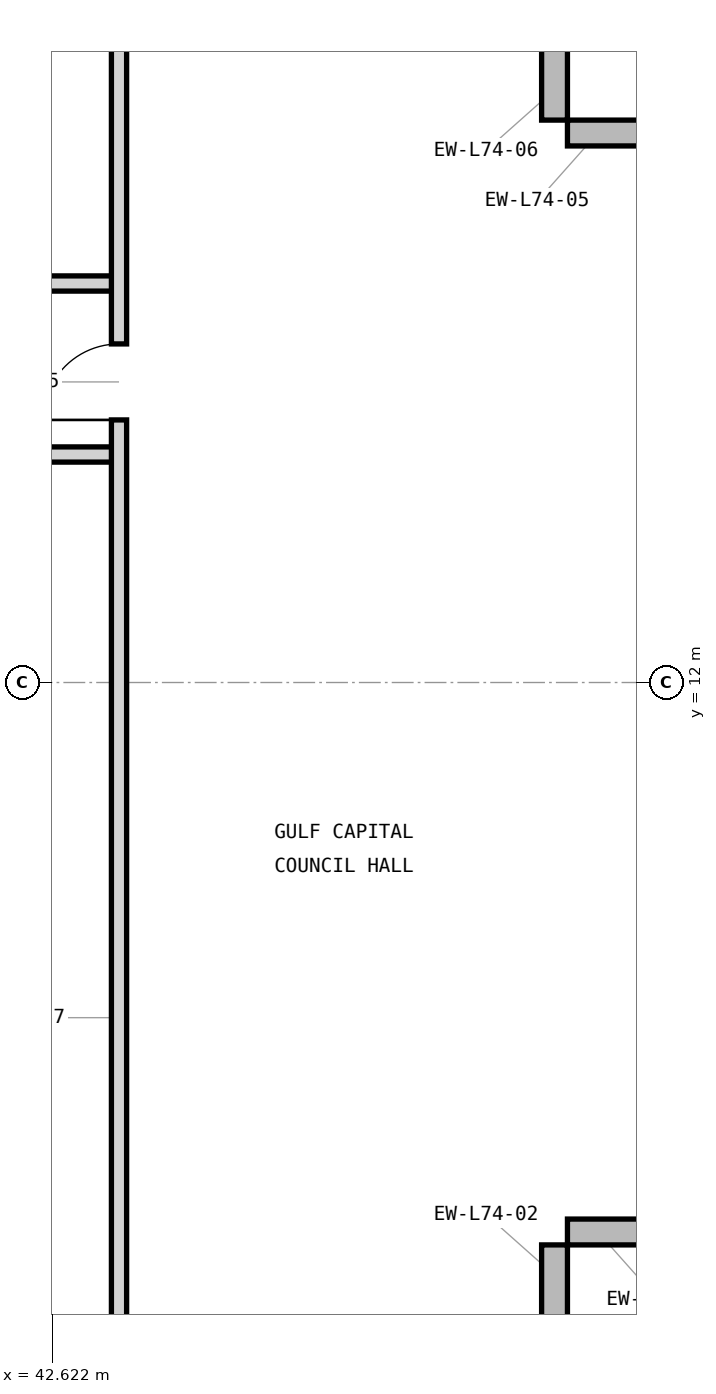
"""IFC4 building model, lengths in metres.
Left out: names, types, materials, properties, quantities, classifications, styles, units other than length and angle.
Written with IfcOpenShell. Run it as: python <this file> out.ifc"""

import sys

from ifc_helpers import new_model, si_unit, direction, frame, frame_2d, origin, place, context, subcontext, project, spatial, rectangle, extrude, element, fill, save


model = new_model("IFC4")
c1 = context("Model", 3, precision=1e-05, world=origin(), true_north=direction((0.0, 1.0)))
c2 = subcontext(c1, "Body", "Model", "MODEL_VIEW")
j1 = project(units=[si_unit("LENGTHUNIT", "METRE"), si_unit("PLANEANGLEUNIT", "RADIAN")], contexts=[c1])
p1 = place(None, origin())
s1 = spatial("IfcSite", under=j1, at=p1, CompositionType="ELEMENT")
p2 = place(p1, origin())
s2 = spatial("IfcBuilding", under=s1, at=p2, CompositionType="ELEMENT")
p3 = place(p2, frame((0.0, 0.0, 301.5)))
s3 = spatial("IfcBuildingStorey", under=s2, at=p3, CompositionType="ELEMENT", Elevation=301.5)
for number, where, z_axis, x_axis in (
    (1, (49.23, 3.0, 0.0), (0.0, 0.0, 1.0), (0.0, 1.0, 0.0)),
    (2, (49.4, 4.77, 0.0), (0.0, 0.0, 1.0), (1.0, 0.0, 0.0)),
    (3, (51.0, 19.23, 0.0), (0.0, 0.0, 1.0), (-1.0, 0.0, 0.0)),
    (4, (49.23, 19.4, 0.0), (0.0, 0.0, 1.0), (0.0, 1.0, 0.0)),
):
    element("IfcWall", number, at=place(p3, frame(where, z_axis=z_axis, x_axis=x_axis)), inside=s3, PredefinedType="STANDARD", context=c2, shape_type="SweptSolid", body=[
        extrude(rectangle(XDim=1.6, YDim=0.34, at=frame_2d((0.8, 0.0))), origin(), (0.0, 0.0, 1.0), 3.715),
    ])
p4 = place(p3, frame((37.2, 15.0, 0.0), z_axis=(0.0, 0.0, 1.0), x_axis=(1.0, 0.0, 0.0)))
e5 = element("IfcWall", 5, at=p4, inside=s3, PredefinedType="PARTITIONING", context=c2, shape_type="SweptSolid", body=[
    extrude(rectangle(XDim=6.3, YDim=0.2, at=frame_2d((3.15, 0.0))), origin(), (0.0, 0.0, 1.0), 3.354),
])
p5 = place(p4, frame((2.4, 0.0, 0.0)))
e6 = element("IfcOpeningElement", 6, at=p5, cuts=e5, PredefinedType="OPENING", context=c2, shape_type="SweptSolid", body=[
    extrude(rectangle(XDim=1.5, YDim=2.3, at=frame_2d((0.75, 1.15))), frame((0.0, 0.11, 0.0), z_axis=(0.0, -1.0, 0.0), x_axis=(1.0, 0.0, 0.0)), (0.0, 0.0, 1.0), 0.22),
])
p6 = place(p3, frame((39.2, 17.25, 0.0), z_axis=(0.0, 0.0, 1.0), x_axis=(1.0, 0.0, 0.0)))
e7 = element("IfcWall", 7, at=p6, inside=s3, PredefinedType="PARTITIONING", context=c2, shape_type="SweptSolid", body=[
    extrude(rectangle(XDim=4.3, YDim=0.2, at=frame_2d((2.15, 0.0))), origin(), (0.0, 0.0, 1.0), 3.705),
])
p7 = place(p6, frame((1.65, 0.0, 0.0)))
e8 = element("IfcOpeningElement", 8, at=p7, cuts=e7, PredefinedType="OPENING", context=c2, shape_type="SweptSolid", body=[
    extrude(rectangle(XDim=1.0, YDim=2.15, at=frame_2d((0.5, 1.075))), frame((0.0, 0.11, 0.0), z_axis=(0.0, -1.0, 0.0), x_axis=(1.0, 0.0, 0.0)), (0.0, 0.0, 1.0), 0.22),
])
p8 = place(p3, frame((43.5, 3.18, 0.0), z_axis=(0.0, 0.0, 1.0), x_axis=(0.0, 1.0, 0.0)))
e9 = element("IfcWall", 9, at=p8, inside=s3, PredefinedType="PARTITIONING", context=c2, shape_type="SweptSolid", body=[
    extrude(rectangle(XDim=17.64, YDim=0.2, at=frame_2d((8.82, 0.0))), origin(), (0.0, 0.0, 1.0), 3.705),
])
p9 = place(p8, frame((12.275, 0.0, 0.0)))
e10 = element("IfcOpeningElement", 10, at=p9, cuts=e9, PredefinedType="OPENING", context=c2, shape_type="SweptSolid", body=[
    extrude(rectangle(XDim=1.0, YDim=2.15, at=frame_2d((0.5, 1.075))), frame((0.0, 0.11, 0.0), z_axis=(0.0, -1.0, 0.0), x_axis=(1.0, 0.0, 0.0)), (0.0, 0.0, 1.0), 0.22),
])
p10 = place(p9, origin())
e11 = element("IfcDoor", 11, at=p10, inside=s3, OperationType="SINGLE_SWING_LEFT", PredefinedType="DOOR", context=c2, shape_type="SweptSolid", body=[
    extrude(rectangle(XDim=1.0, YDim=2.15, at=frame_2d((0.5, 1.075))), frame((0.0, 0.025, 0.0), z_axis=(0.0, -1.0, 0.0), x_axis=(1.0, 0.0, 0.0)), (0.0, 0.0, 1.0), 0.05),
])
fill(e10, e11)
save(model, sys.argv[1])
